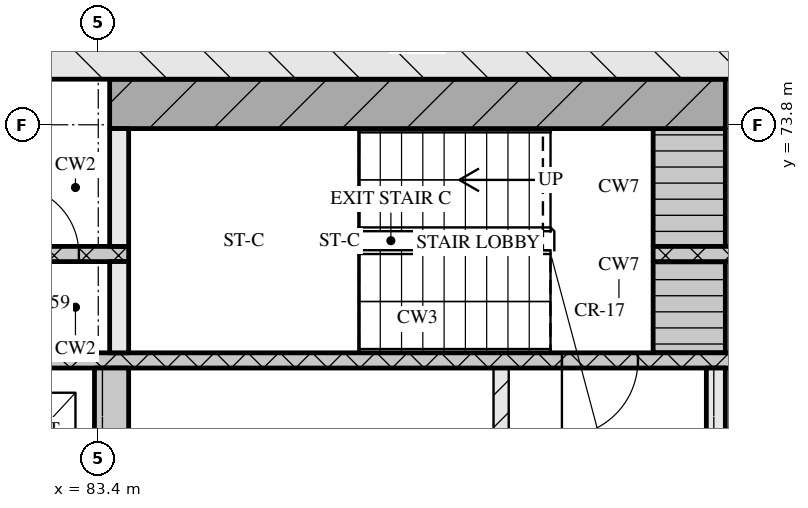
"""IFC4 building model, lengths in metres.
Left out: names, types, materials, properties, quantities, classifications, styles, units other than length and angle.
Written with IfcOpenShell. Run it as: python <this file> out.ifc"""

import sys

from ifc_helpers import new_model, si_unit, direction, frame, frame_2d, origin, place, context, subcontext, project, spatial, rectangle, extrude, element, fill, save


model = new_model("IFC4")
c1 = context("Model", 3, precision=1e-05, world=origin(), true_north=direction((0.0, 1.0)))
c2 = subcontext(c1, "Body", "Model", "MODEL_VIEW")
j1 = project(units=[si_unit("LENGTHUNIT", "METRE"), si_unit("PLANEANGLEUNIT", "RADIAN")], contexts=[c1])
p1 = place(None, origin())
s1 = spatial("IfcSite", under=j1, at=p1, CompositionType="ELEMENT")
p2 = place(p1, origin())
s2 = spatial("IfcBuilding", under=s1, at=p2, CompositionType="ELEMENT")
p3 = place(p2, frame((0.0, 0.0, 109.65)))
s3 = spatial("IfcBuildingStorey", under=s2, at=p3, CompositionType="ELEMENT", Elevation=109.65)
p4 = place(p3, frame((66.8, 74.9, 0.0), z_axis=(0.0, 0.0, 1.0), x_axis=(1.0, 0.0, 0.0)))
e1 = element("IfcWall", 1, at=p4, inside=s3, PredefinedType="SOLIDWALL", context=c2, shape_type="SweptSolid", body=[
    extrude(rectangle(XDim=41.6, YDim=1.0, at=frame_2d((20.8, 0.0))), origin(), (0.0, 0.0, 1.0), 3.32),
])
p5 = place(p3, frame((83.575, 68.0, 0.0), z_axis=(0.0, 0.0, 1.0), x_axis=(0.0, 1.0, 0.0)))
e2 = element("IfcWall", 2, at=p5, inside=s3, PredefinedType="SOLIDWALL", context=c2, shape_type="SweptSolid", body=[
    extrude(rectangle(XDim=2.6, YDim=0.45, at=frame_2d((1.3, 0.0))), origin(), (0.0, 0.0, 1.0), 3.32),
])
p6 = place(p3, frame((88.7, 68.0, 0.0), z_axis=(0.0, 0.0, 1.0), x_axis=(0.0, 1.0, 0.0)))
e3 = element("IfcWall", 3, at=p6, inside=s3, PredefinedType="PARTITIONING", context=c2, shape_type="SweptSolid", body=[
    extrude(rectangle(XDim=2.6, YDim=0.2, at=frame_2d((1.3, 0.0))), origin(), (0.0, 0.0, 1.0), 3.32),
])
p7 = place(p3, frame((91.525, 68.0, 0.0), z_axis=(0.0, 0.0, 1.0), x_axis=(0.0, 1.0, 0.0)))
e4 = element("IfcWall", 4, at=p7, inside=s3, PredefinedType="SOLIDWALL", context=c2, shape_type="SweptSolid", body=[
    extrude(rectangle(XDim=2.6, YDim=0.25, at=frame_2d((1.3, 0.0))), origin(), (0.0, 0.0, 1.0), 3.32),
])
p8 = place(p3, frame((67.8, 70.7, 0.0), z_axis=(0.0, 0.0, 1.0), x_axis=(1.0, 0.0, 0.0)))
e5 = element("IfcWall", 5, at=p8, inside=s3, PredefinedType="SOLIDWALL", context=c2, shape_type="SweptSolid", body=[
    extrude(rectangle(XDim=39.6, YDim=0.2, at=frame_2d((19.8, 0.0))), origin(), (0.0, 0.0, 1.0), 3.32),
])
p9 = place(p8, frame((0.65, 0.0, 0.0)))
e6 = element("IfcOpeningElement", 6, at=p9, cuts=e5, PredefinedType="OPENING", context=c2, shape_type="SweptSolid", body=[
    extrude(rectangle(XDim=1.1, YDim=2.1, at=frame_2d((0.55, 1.05))), frame((0.0, 0.11, 0.0), z_axis=(0.0, -1.0, 0.0), x_axis=(1.0, 0.0, 0.0)), (0.0, 0.0, 1.0), 0.22),
])
p10 = place(p8, frame((3.25, 0.0, 0.0)))
e7 = element("IfcOpeningElement", 7, at=p10, cuts=e5, PredefinedType="OPENING", context=c2, shape_type="SweptSolid", body=[
    extrude(rectangle(XDim=1.1, YDim=2.1, at=frame_2d((0.55, 1.05))), frame((0.0, 0.11, 0.0), z_axis=(0.0, -1.0, 0.0), x_axis=(1.0, 0.0, 0.0)), (0.0, 0.0, 1.0), 0.22),
])
p11 = place(p8, frame((5.9, 0.0, 0.0)))
e8 = element("IfcOpeningElement", 8, at=p11, cuts=e5, PredefinedType="OPENING", context=c2, shape_type="SweptSolid", body=[
    extrude(rectangle(XDim=1.0, YDim=2.1, at=frame_2d((0.5, 1.05))), frame((0.0, 0.11, 0.0), z_axis=(0.0, -1.0, 0.0), x_axis=(1.0, 0.0, 0.0)), (0.0, 0.0, 1.0), 0.22),
])
p12 = place(p8, frame((21.7, 0.0, 0.0)))
e9 = element("IfcOpeningElement", 9, at=p12, cuts=e5, PredefinedType="OPENING", context=c2, shape_type="SweptSolid", body=[
    extrude(rectangle(XDim=1.0, YDim=2.1, at=frame_2d((0.5, 1.05))), frame((0.0, 0.11, 0.0), z_axis=(0.0, -1.0, 0.0), x_axis=(1.0, 0.0, 0.0)), (0.0, 0.0, 1.0), 0.22),
])
p13 = place(p8, frame((32.7, 0.0, 0.0)))
e10 = element("IfcOpeningElement", 10, at=p13, cuts=e5, PredefinedType="OPENING", context=c2, shape_type="SweptSolid", body=[
    extrude(rectangle(XDim=1.0, YDim=2.1, at=frame_2d((0.5, 1.05))), frame((0.0, 0.11, 0.0), z_axis=(0.0, -1.0, 0.0), x_axis=(1.0, 0.0, 0.0)), (0.0, 0.0, 1.0), 0.22),
])
p14 = place(p8, frame((35.25, 0.0, 0.0)))
e11 = element("IfcOpeningElement", 11, at=p14, cuts=e5, PredefinedType="OPENING", context=c2, shape_type="SweptSolid", body=[
    extrude(rectangle(XDim=1.1, YDim=2.1, at=frame_2d((0.55, 1.05))), frame((0.0, 0.11, 0.0), z_axis=(0.0, -1.0, 0.0), x_axis=(1.0, 0.0, 0.0)), (0.0, 0.0, 1.0), 0.22),
])
p15 = place(p8, frame((37.85, 0.0, 0.0)))
e12 = element("IfcOpeningElement", 12, at=p15, cuts=e5, PredefinedType="OPENING", context=c2, shape_type="SweptSolid", body=[
    extrude(rectangle(XDim=1.1, YDim=2.1, at=frame_2d((0.55, 1.05))), frame((0.0, 0.11, 0.0), z_axis=(0.0, -1.0, 0.0), x_axis=(1.0, 0.0, 0.0)), (0.0, 0.0, 1.0), 0.22),
])
p16 = place(p3, frame((83.675, 70.8, 0.0), z_axis=(0.0, 0.0, 1.0), x_axis=(0.0, 1.0, 0.0)))
e13 = element("IfcWall", 13, at=p16, inside=s3, PredefinedType="SOLIDWALL", context=c2, shape_type="SweptSolid", body=[
    extrude(rectangle(XDim=1.2, YDim=0.25, at=frame_2d((0.6, 0.0))), origin(), (0.0, 0.0, 1.0), 3.32),
])
p17 = place(p3, frame((91.175, 70.8, 0.0), z_axis=(0.0, 0.0, 1.0), x_axis=(0.0, 1.0, 0.0)))
e14 = element("IfcWall", 14, at=p17, inside=s3, PredefinedType="SOLIDWALL", context=c2, shape_type="SweptSolid", body=[
    extrude(rectangle(XDim=1.2, YDim=0.95, at=frame_2d((0.6, 0.0))), origin(), (0.0, 0.0, 1.0), 3.32),
])
p18 = place(p3, frame((72.8, 72.1, 0.0), z_axis=(0.0, 0.0, 1.0), x_axis=(1.0, 0.0, 0.0)))
e15 = element("IfcWall", 15, at=p18, inside=s3, PredefinedType="SOLIDWALL", context=c2, shape_type="SweptSolid", body=[
    extrude(rectangle(XDim=11.0, YDim=0.2, at=frame_2d((5.5, 0.0))), origin(), (0.0, 0.0, 1.0), 3.32),
])
p19 = place(p18, frame((1.25, 0.0, 0.0)))
e16 = element("IfcOpeningElement", 16, at=p19, cuts=e15, PredefinedType="OPENING", context=c2, shape_type="SweptSolid", body=[
    extrude(rectangle(XDim=0.9, YDim=2.1, at=frame_2d((0.45, 1.05))), frame((0.0, 0.11, 0.0), z_axis=(0.0, -1.0, 0.0), x_axis=(1.0, 0.0, 0.0)), (0.0, 0.0, 1.0), 0.22),
])
p20 = place(p18, frame((4.65, 0.0, 0.0)))
e17 = element("IfcOpeningElement", 17, at=p20, cuts=e15, PredefinedType="OPENING", context=c2, shape_type="SweptSolid", body=[
    extrude(rectangle(XDim=0.9, YDim=2.1, at=frame_2d((0.45, 1.05))), frame((0.0, 0.11, 0.0), z_axis=(0.0, -1.0, 0.0), x_axis=(1.0, 0.0, 0.0)), (0.0, 0.0, 1.0), 0.22),
])
p21 = place(p18, frame((7.47, 0.0, 0.0)))
e18 = element("IfcOpeningElement", 18, at=p21, cuts=e15, PredefinedType="OPENING", context=c2, shape_type="SweptSolid", body=[
    extrude(rectangle(XDim=0.9, YDim=2.1, at=frame_2d((0.45, 1.05))), frame((0.0, 0.11, 0.0), z_axis=(0.0, -1.0, 0.0), x_axis=(1.0, 0.0, 0.0)), (0.0, 0.0, 1.0), 0.22),
])
p22 = place(p18, frame((9.445, 0.0, 0.0)))
e19 = element("IfcOpeningElement", 19, at=p22, cuts=e15, PredefinedType="OPENING", context=c2, shape_type="SweptSolid", body=[
    extrude(rectangle(XDim=0.9, YDim=2.1, at=frame_2d((0.45, 1.05))), frame((0.0, 0.11, 0.0), z_axis=(0.0, -1.0, 0.0), x_axis=(1.0, 0.0, 0.0)), (0.0, 0.0, 1.0), 0.22),
])
p23 = place(p3, frame((90.7, 72.1, 0.0), z_axis=(0.0, 0.0, 1.0), x_axis=(1.0, 0.0, 0.0)))
e20 = element("IfcWall", 20, at=p23, inside=s3, PredefinedType="SOLIDWALL", context=c2, shape_type="SweptSolid", body=[
    extrude(rectangle(XDim=11.7, YDim=0.2, at=frame_2d((5.85, 0.0))), origin(), (0.0, 0.0, 1.0), 3.32),
])
p24 = place(p23, frame((1.6, 0.0, 0.0)))
e21 = element("IfcOpeningElement", 21, at=p24, cuts=e20, PredefinedType="OPENING", context=c2, shape_type="SweptSolid", body=[
    extrude(rectangle(XDim=0.9, YDim=2.1, at=frame_2d((0.45, 1.05))), frame((0.0, 0.11, 0.0), z_axis=(0.0, -1.0, 0.0), x_axis=(1.0, 0.0, 0.0)), (0.0, 0.0, 1.0), 0.22),
])
p25 = place(p23, frame((5.335, 0.0, 0.0)))
e22 = element("IfcOpeningElement", 22, at=p25, cuts=e20, PredefinedType="OPENING", context=c2, shape_type="SweptSolid", body=[
    extrude(rectangle(XDim=0.9, YDim=2.1, at=frame_2d((0.45, 1.05))), frame((0.0, 0.11, 0.0), z_axis=(0.0, -1.0, 0.0), x_axis=(1.0, 0.0, 0.0)), (0.0, 0.0, 1.0), 0.22),
])
p26 = place(p23, frame((9.55, 0.0, 0.0)))
e23 = element("IfcOpeningElement", 23, at=p26, cuts=e20, PredefinedType="OPENING", context=c2, shape_type="SweptSolid", body=[
    extrude(rectangle(XDim=0.9, YDim=2.1, at=frame_2d((0.45, 1.05))), frame((0.0, 0.11, 0.0), z_axis=(0.0, -1.0, 0.0), x_axis=(1.0, 0.0, 0.0)), (0.0, 0.0, 1.0), 0.22),
])
p27 = place(p3, frame((83.675, 72.2, 0.0), z_axis=(0.0, 0.0, 1.0), x_axis=(0.0, 1.0, 0.0)))
e24 = element("IfcWall", 24, at=p27, inside=s3, PredefinedType="SOLIDWALL", context=c2, shape_type="SweptSolid", body=[
    extrude(rectangle(XDim=1.55, YDim=0.25, at=frame_2d((0.775, 0.0))), origin(), (0.0, 0.0, 1.0), 3.32),
])
p28 = place(p3, frame((91.175, 72.2, 0.0), z_axis=(0.0, 0.0, 1.0), x_axis=(0.0, 1.0, 0.0)))
e25 = element("IfcWall", 25, at=p28, inside=s3, PredefinedType="SOLIDWALL", context=c2, shape_type="SweptSolid", body=[
    extrude(rectangle(XDim=1.55, YDim=0.95, at=frame_2d((0.775, 0.0))), origin(), (0.0, 0.0, 1.0), 3.32),
])
p29 = place(p3, frame((83.55, 74.075, 0.0), z_axis=(0.0, 0.0, 1.0), x_axis=(1.0, 0.0, 0.0)))
e26 = element("IfcWall", 26, at=p29, inside=s3, PredefinedType="SOLIDWALL", context=c2, shape_type="SweptSolid", body=[
    extrude(rectangle(XDim=8.1, YDim=0.65, at=frame_2d((4.05, 0.0))), origin(), (0.0, 0.0, 1.0), 3.32),
])
p30 = place(p12, origin())
e27 = element("IfcDoor", 27, at=p30, inside=s3, OperationType="SINGLE_SWING_RIGHT", PredefinedType="DOOR", context=c2, shape_type="SweptSolid", body=[
    extrude(rectangle(XDim=1.0, YDim=2.1, at=frame_2d((0.5, 1.05))), frame((0.0, 0.025, 0.0), z_axis=(0.0, -1.0, 0.0), x_axis=(1.0, 0.0, 0.0)), (0.0, 0.0, 1.0), 0.05),
])
fill(e9, e27)
p31 = place(p22, origin())
e28 = element("IfcDoor", 28, at=p31, inside=s3, OperationType="SINGLE_SWING_LEFT", PredefinedType="DOOR", context=c2, shape_type="SweptSolid", body=[
    extrude(rectangle(XDim=0.9, YDim=2.1, at=frame_2d((0.45, 1.05))), frame((0.0, 0.025, 0.0), z_axis=(0.0, -1.0, 0.0), x_axis=(1.0, 0.0, 0.0)), (0.0, 0.0, 1.0), 0.05),
])
fill(e19, e28)
save(model, sys.argv[1])
